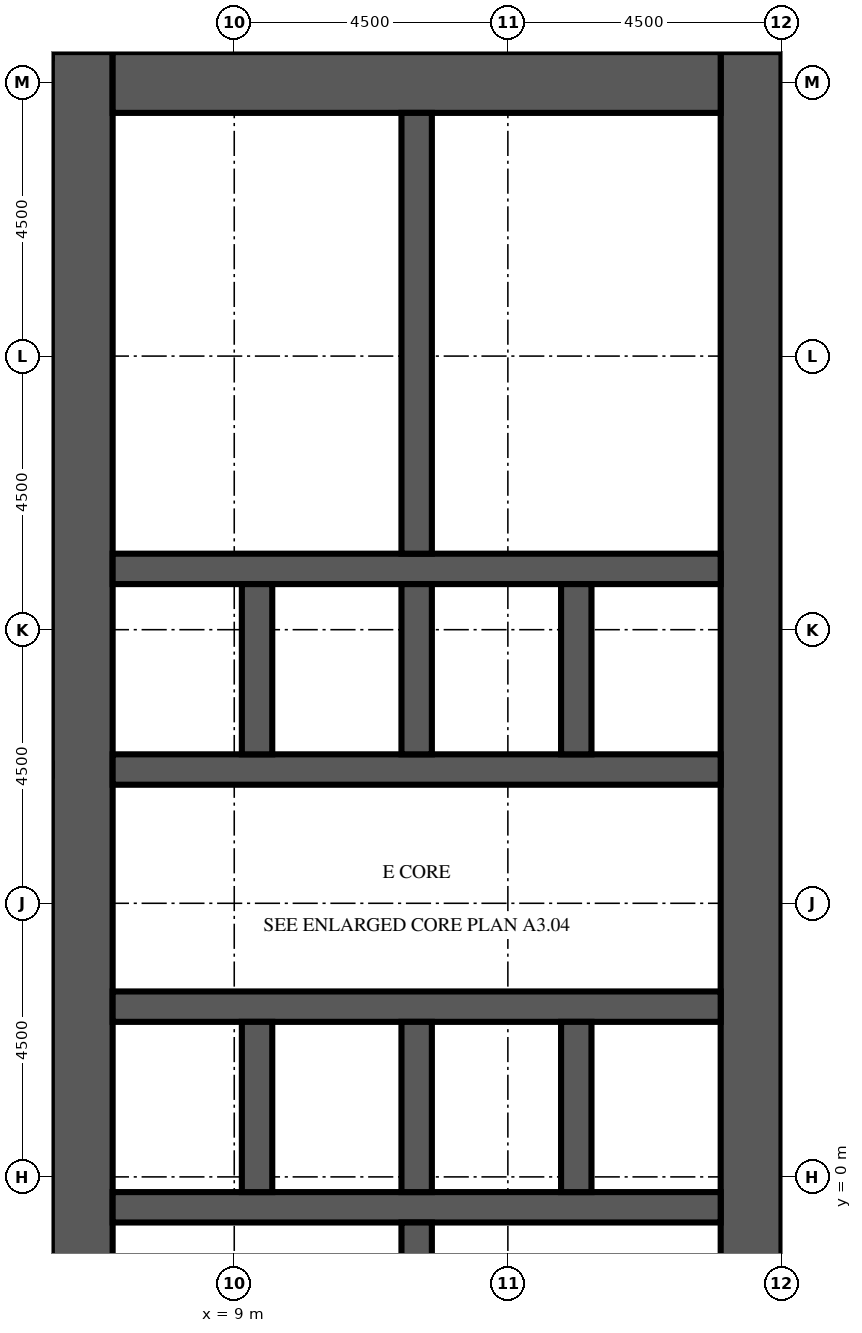
"""IFC4 building model, lengths in metres.
Left out: names, types, materials, properties, quantities, classifications, styles, units other than length and angle.
Written with IfcOpenShell. Run it as: python <this file> out.ifc"""

import sys

from ifc_helpers import new_model, si_unit, direction, frame, frame_2d, origin, place, context, subcontext, project, spatial, rectangle, extrude, element, fill, save


model = new_model("IFC4")
c1 = context("Model", 3, precision=1e-05, world=origin(), true_north=direction((0.0, 1.0)))
c2 = subcontext(c1, "Body", "Model", "MODEL_VIEW")
j1 = project(units=[si_unit("LENGTHUNIT", "METRE"), si_unit("PLANEANGLEUNIT", "RADIAN")], contexts=[c1])
p1 = place(None, origin())
s1 = spatial("IfcSite", under=j1, at=p1, CompositionType="ELEMENT")
p2 = place(p1, origin())
s2 = spatial("IfcBuilding", under=s1, at=p2, CompositionType="ELEMENT")
p3 = place(p2, frame((0.0, 0.0, 7.2)))
s3 = spatial("IfcBuildingStorey", under=s2, at=p3, CompositionType="ELEMENT", Elevation=7.2)
p4 = place(p3, frame((6.5, -9.0, 0.0), z_axis=(0.0, 0.0, 1.0), x_axis=(0.0, 1.0, 0.0)))
e1 = element("IfcWall", 1, at=p4, inside=s3, PredefinedType="SHEAR", context=c2, shape_type="SweptSolid", body=[
    extrude(rectangle(XDim=27.5, YDim=1.0, at=frame_2d((13.75, 0.0))), origin(), (0.0, 0.0, 1.0), 4.1),
])
p5 = place(p4, frame((12.55, 0.0, 0.0)))
e2 = element("IfcOpeningElement", 2, at=p5, cuts=e1, PredefinedType="OPENING", context=c2, shape_type="SweptSolid", body=[
    extrude(rectangle(XDim=2.4, YDim=2.4, at=frame_2d((1.2, 1.2))), frame((0.0, 0.51, 0.0), z_axis=(0.0, -1.0, 0.0), x_axis=(1.0, 0.0, 0.0)), (0.0, 0.0, 1.0), 1.02),
])
p6 = place(p4, frame((4.025, 0.0, 0.0)))
e3 = element("IfcOpeningElement", 3, at=p6, cuts=e1, PredefinedType="OPENING", context=c2, shape_type="SweptSolid", body=[
    extrude(rectangle(XDim=1.2, YDim=2.1, at=frame_2d((0.6, 1.05))), frame((0.0, 0.51, 0.0), z_axis=(0.0, -1.0, 0.0), x_axis=(1.0, 0.0, 0.0)), (0.0, 0.0, 1.0), 1.02),
])
p7 = place(p4, frame((22.275, 0.0, 0.0)))
e4 = element("IfcOpeningElement", 4, at=p7, cuts=e1, PredefinedType="OPENING", context=c2, shape_type="SweptSolid", body=[
    extrude(rectangle(XDim=1.2, YDim=2.1, at=frame_2d((0.6, 1.05))), frame((0.0, 0.51, 0.0), z_axis=(0.0, -1.0, 0.0), x_axis=(1.0, 0.0, 0.0)), (0.0, 0.0, 1.0), 1.02),
])
p8 = place(p3, frame((17.5, -9.0, 0.0), z_axis=(0.0, 0.0, 1.0), x_axis=(0.0, 1.0, 0.0)))
e5 = element("IfcWall", 5, at=p8, inside=s3, PredefinedType="SHEAR", context=c2, shape_type="SweptSolid", body=[
    extrude(rectangle(XDim=27.5, YDim=1.0, at=frame_2d((13.75, 0.0))), origin(), (0.0, 0.0, 1.0), 4.1),
])
p9 = place(p8, frame((12.55, 0.0, 0.0)))
e6 = element("IfcOpeningElement", 6, at=p9, cuts=e5, PredefinedType="OPENING", context=c2, shape_type="SweptSolid", body=[
    extrude(rectangle(XDim=2.4, YDim=2.4, at=frame_2d((1.2, 1.2))), frame((0.0, 0.51, 0.0), z_axis=(0.0, -1.0, 0.0), x_axis=(1.0, 0.0, 0.0)), (0.0, 0.0, 1.0), 1.02),
])
p10 = place(p8, frame((6.825, 0.0, 0.0)))
e7 = element("IfcOpeningElement", 7, at=p10, cuts=e5, PredefinedType="OPENING", context=c2, shape_type="SweptSolid", body=[
    extrude(rectangle(XDim=1.2, YDim=2.1, at=frame_2d((0.6, 1.05))), frame((0.0, 0.51, 0.0), z_axis=(0.0, -1.0, 0.0), x_axis=(1.0, 0.0, 0.0)), (0.0, 0.0, 1.0), 1.02),
])
p11 = place(p8, frame((19.475, 0.0, 0.0)))
e8 = element("IfcOpeningElement", 8, at=p11, cuts=e5, PredefinedType="OPENING", context=c2, shape_type="SweptSolid", body=[
    extrude(rectangle(XDim=1.2, YDim=2.1, at=frame_2d((0.6, 1.05))), frame((0.0, 0.51, 0.0), z_axis=(0.0, -1.0, 0.0), x_axis=(1.0, 0.0, 0.0)), (0.0, 0.0, 1.0), 1.02),
])
p12 = place(p3, frame((7.0, 18.0, 0.0), z_axis=(0.0, 0.0, 1.0), x_axis=(1.0, 0.0, 0.0)))
e9 = element("IfcWall", 9, at=p12, inside=s3, PredefinedType="SHEAR", context=c2, shape_type="SweptSolid", body=[
    extrude(rectangle(XDim=10.0, YDim=1.0, at=frame_2d((5.0, 0.0))), origin(), (0.0, 0.0, 1.0), 4.1),
])
p13 = place(p3, frame((7.0, -0.5, 0.0), z_axis=(0.0, 0.0, 1.0), x_axis=(1.0, 0.0, 0.0)))
e10 = element("IfcWall", 10, at=p13, inside=s3, PredefinedType="SHEAR", context=c2, shape_type="SweptSolid", body=[
    extrude(rectangle(XDim=10.0, YDim=0.5, at=frame_2d((5.0, 0.0))), origin(), (0.0, 0.0, 1.0), 4.1),
])
p14 = place(p3, frame((7.0, 2.8, 0.0), z_axis=(0.0, 0.0, 1.0), x_axis=(1.0, 0.0, 0.0)))
e11 = element("IfcWall", 11, at=p14, inside=s3, PredefinedType="SHEAR", context=c2, shape_type="SweptSolid", body=[
    extrude(rectangle(XDim=10.0, YDim=0.5, at=frame_2d((5.0, 0.0))), origin(), (0.0, 0.0, 1.0), 4.1),
])
p15 = place(p14, frame((0.512, 0.0, 0.0)))
e12 = element("IfcOpeningElement", 12, at=p15, cuts=e11, PredefinedType="OPENING", context=c2, shape_type="SweptSolid", body=[
    extrude(rectangle(XDim=1.1, YDim=2.1, at=frame_2d((0.55, 1.05))), frame((0.0, 0.26, 0.0), z_axis=(0.0, -1.0, 0.0), x_axis=(1.0, 0.0, 0.0)), (0.0, 0.0, 1.0), 0.52),
])
p16 = place(p14, frame((3.137, 0.0, 0.0)))
e13 = element("IfcOpeningElement", 13, at=p16, cuts=e11, PredefinedType="OPENING", context=c2, shape_type="SweptSolid", body=[
    extrude(rectangle(XDim=1.1, YDim=2.1, at=frame_2d((0.55, 1.05))), frame((0.0, 0.26, 0.0), z_axis=(0.0, -1.0, 0.0), x_axis=(1.0, 0.0, 0.0)), (0.0, 0.0, 1.0), 0.52),
])
p17 = place(p14, frame((8.387, 0.0, 0.0)))
e14 = element("IfcOpeningElement", 14, at=p17, cuts=e11, PredefinedType="OPENING", context=c2, shape_type="SweptSolid", body=[
    extrude(rectangle(XDim=1.1, YDim=2.1, at=frame_2d((0.55, 1.05))), frame((0.0, 0.26, 0.0), z_axis=(0.0, -1.0, 0.0), x_axis=(1.0, 0.0, 0.0)), (0.0, 0.0, 1.0), 0.52),
])
p18 = place(p3, frame((7.0, 6.7, 0.0), z_axis=(0.0, 0.0, 1.0), x_axis=(1.0, 0.0, 0.0)))
e15 = element("IfcWall", 15, at=p18, inside=s3, PredefinedType="SHEAR", context=c2, shape_type="SweptSolid", body=[
    extrude(rectangle(XDim=10.0, YDim=0.5, at=frame_2d((5.0, 0.0))), origin(), (0.0, 0.0, 1.0), 4.1),
])
p19 = place(p18, frame((0.512, 0.0, 0.0)))
e16 = element("IfcOpeningElement", 16, at=p19, cuts=e15, PredefinedType="OPENING", context=c2, shape_type="SweptSolid", body=[
    extrude(rectangle(XDim=1.1, YDim=2.1, at=frame_2d((0.55, 1.05))), frame((0.0, 0.26, 0.0), z_axis=(0.0, -1.0, 0.0), x_axis=(1.0, 0.0, 0.0)), (0.0, 0.0, 1.0), 0.52),
])
p20 = place(p18, frame((3.188, 0.0, 0.0)))
e17 = element("IfcOpeningElement", 17, at=p20, cuts=e15, PredefinedType="OPENING", context=c2, shape_type="SweptSolid", body=[
    extrude(rectangle(XDim=1.0, YDim=2.1, at=frame_2d((0.5, 1.05))), frame((0.0, 0.26, 0.0), z_axis=(0.0, -1.0, 0.0), x_axis=(1.0, 0.0, 0.0)), (0.0, 0.0, 1.0), 0.52),
])
p21 = place(p18, frame((5.812, 0.0, 0.0)))
e18 = element("IfcOpeningElement", 18, at=p21, cuts=e15, PredefinedType="OPENING", context=c2, shape_type="SweptSolid", body=[
    extrude(rectangle(XDim=1.0, YDim=2.1, at=frame_2d((0.5, 1.05))), frame((0.0, 0.26, 0.0), z_axis=(0.0, -1.0, 0.0), x_axis=(1.0, 0.0, 0.0)), (0.0, 0.0, 1.0), 0.52),
])
p22 = place(p18, frame((8.438, 0.0, 0.0)))
e19 = element("IfcOpeningElement", 19, at=p22, cuts=e15, PredefinedType="OPENING", context=c2, shape_type="SweptSolid", body=[
    extrude(rectangle(XDim=1.0, YDim=2.1, at=frame_2d((0.5, 1.05))), frame((0.0, 0.26, 0.0), z_axis=(0.0, -1.0, 0.0), x_axis=(1.0, 0.0, 0.0)), (0.0, 0.0, 1.0), 0.52),
])
p23 = place(p3, frame((7.0, 10.0, 0.0), z_axis=(0.0, 0.0, 1.0), x_axis=(1.0, 0.0, 0.0)))
e20 = element("IfcWall", 20, at=p23, inside=s3, PredefinedType="SHEAR", context=c2, shape_type="SweptSolid", body=[
    extrude(rectangle(XDim=10.0, YDim=0.5, at=frame_2d((5.0, 0.0))), origin(), (0.0, 0.0, 1.0), 4.1),
])
for number, where, z_axis, x_axis in (
    (21, (9.375, -0.25, 0.0), (0.0, 0.0, 1.0), (0.0, 1.0, 0.0)),
    (22, (9.375, 6.95, 0.0), (0.0, 0.0, 1.0), (0.0, 1.0, 0.0)),
    (23, (12.0, -0.25, 0.0), (0.0, 0.0, 1.0), (0.0, 1.0, 0.0)),
    (24, (12.0, 6.95, 0.0), (0.0, 0.0, 1.0), (0.0, 1.0, 0.0)),
    (25, (14.625, -0.25, 0.0), (0.0, 0.0, 1.0), (0.0, 1.0, 0.0)),
    (26, (14.625, 6.95, 0.0), (0.0, 0.0, 1.0), (0.0, 1.0, 0.0)),
):
    element("IfcWall", number, at=place(p3, frame(where, z_axis=z_axis, x_axis=x_axis)), inside=s3, PredefinedType="SHEAR", context=c2, shape_type="SweptSolid", body=[
        extrude(rectangle(XDim=2.8, YDim=0.5, at=frame_2d((1.4, 0.0))), origin(), (0.0, 0.0, 1.0), 4.1),
    ])
for number, where, z_axis, x_axis in (
    (27, (12.0, -8.0, 0.0), (0.0, 0.0, 1.0), (0.0, 1.0, 0.0)),
    (28, (12.0, 10.25, 0.0), (0.0, 0.0, 1.0), (0.0, 1.0, 0.0)),
):
    element("IfcWall", number, at=place(p3, frame(where, z_axis=z_axis, x_axis=x_axis)), inside=s3, PredefinedType="SHEAR", context=c2, shape_type="SweptSolid", body=[
        extrude(rectangle(XDim=7.25, YDim=0.5, at=frame_2d((3.625, 0.0))), origin(), (0.0, 0.0, 1.0), 4.1),
    ])
p24 = place(p3, frame((8.5, -3.505, 0.0), z_axis=(0.0, 0.0, 1.0), x_axis=(0.0, 1.0, 0.0)))
e29 = element("IfcWall", 29, at=p24, inside=s3, PredefinedType="PARTITIONING", context=c2, shape_type="SweptSolid", body=[
    extrude(rectangle(XDim=2.755, YDim=0.1, at=frame_2d((1.377, 0.0))), origin(), (0.0, 0.0, 1.0), 3.65),
])
p25 = place(p24, frame((0.877, 0.0, 0.0)))
e30 = element("IfcOpeningElement", 30, at=p25, cuts=e29, PredefinedType="OPENING", context=c2, shape_type="SweptSolid", body=[
    extrude(rectangle(XDim=1.0, YDim=2.1, at=frame_2d((0.5, 1.05))), frame((0.0, 0.06, 0.0), z_axis=(0.0, -1.0, 0.0), x_axis=(1.0, 0.0, 0.0)), (0.0, 0.0, 1.0), 0.12),
])
p26 = place(p3, frame((8.4, 10.25, 0.0), z_axis=(0.0, 0.0, 1.0), x_axis=(0.0, 1.0, 0.0)))
e31 = element("IfcWall", 31, at=p26, inside=s3, PredefinedType="PARTITIONING", context=c2, shape_type="SweptSolid", body=[
    extrude(rectangle(XDim=2.175, YDim=0.1, at=frame_2d((1.087, 0.0))), origin(), (0.0, 0.0, 1.0), 3.65),
])
p27 = place(p26, frame((0.587, 0.0, 0.0)))
e32 = element("IfcOpeningElement", 32, at=p27, cuts=e31, PredefinedType="OPENING", context=c2, shape_type="SweptSolid", body=[
    extrude(rectangle(XDim=1.0, YDim=2.1, at=frame_2d((0.5, 1.05))), frame((0.0, 0.06, 0.0), z_axis=(0.0, -1.0, 0.0), x_axis=(1.0, 0.0, 0.0)), (0.0, 0.0, 1.0), 0.12),
])
p28 = place(p3, frame((8.4, 12.425, 0.0), z_axis=(0.0, 0.0, 1.0), x_axis=(0.0, 1.0, 0.0)))
e33 = element("IfcWall", 33, at=p28, inside=s3, PredefinedType="PARTITIONING", context=c2, shape_type="SweptSolid", body=[
    extrude(rectangle(XDim=2.32, YDim=0.1, at=frame_2d((1.16, 0.0))), origin(), (0.0, 0.0, 1.0), 3.65),
])
p29 = place(p28, frame((0.66, 0.0, 0.0)))
e34 = element("IfcOpeningElement", 34, at=p29, cuts=e33, PredefinedType="OPENING", context=c2, shape_type="SweptSolid", body=[
    extrude(rectangle(XDim=1.0, YDim=2.1, at=frame_2d((0.5, 1.05))), frame((0.0, 0.06, 0.0), z_axis=(0.0, -1.0, 0.0), x_axis=(1.0, 0.0, 0.0)), (0.0, 0.0, 1.0), 0.12),
])
p30 = place(p3, frame((8.4, 14.745, 0.0), z_axis=(0.0, 0.0, 1.0), x_axis=(0.0, 1.0, 0.0)))
e35 = element("IfcWall", 35, at=p30, inside=s3, PredefinedType="PARTITIONING", context=c2, shape_type="SweptSolid", body=[
    extrude(rectangle(XDim=2.755, YDim=0.1, at=frame_2d((1.377, 0.0))), origin(), (0.0, 0.0, 1.0), 3.65),
])
p31 = place(p30, frame((0.877, 0.0, 0.0)))
e36 = element("IfcOpeningElement", 36, at=p31, cuts=e35, PredefinedType="OPENING", context=c2, shape_type="SweptSolid", body=[
    extrude(rectangle(XDim=1.0, YDim=2.1, at=frame_2d((0.5, 1.05))), frame((0.0, 0.06, 0.0), z_axis=(0.0, -1.0, 0.0), x_axis=(1.0, 0.0, 0.0)), (0.0, 0.0, 1.0), 0.12),
])
for number, where, z_axis, x_axis in (
    (37, (8.4, 12.425, 0.0), (0.0, 0.0, 1.0), (1.0, 0.0, 0.0)),
    (38, (8.4, 14.745, 0.0), (0.0, 0.0, 1.0), (1.0, 0.0, 0.0)),
):
    element("IfcWall", number, at=place(p3, frame(where, z_axis=z_axis, x_axis=x_axis)), inside=s3, PredefinedType="PARTITIONING", context=c2, shape_type="SweptSolid", body=[
        extrude(rectangle(XDim=3.35, YDim=0.1, at=frame_2d((1.675, 0.0))), origin(), (0.0, 0.0, 1.0), 3.65),
    ])
p32 = place(p15, origin())
e39 = element("IfcDoor", 39, at=p32, inside=s3, OperationType="DOUBLE_DOOR_SLIDING", PredefinedType="DOOR", context=c2, shape_type="SweptSolid", body=[
    extrude(rectangle(XDim=1.1, YDim=2.1, at=frame_2d((0.55, 1.05))), frame((0.0, 0.025, 0.0), z_axis=(0.0, -1.0, 0.0), x_axis=(1.0, 0.0, 0.0)), (0.0, 0.0, 1.0), 0.05),
])
fill(e12, e39)
p33 = place(p16, origin())
e40 = element("IfcDoor", 40, at=p33, inside=s3, OperationType="DOUBLE_DOOR_SLIDING", PredefinedType="DOOR", context=c2, shape_type="SweptSolid", body=[
    extrude(rectangle(XDim=1.1, YDim=2.1, at=frame_2d((0.55, 1.05))), frame((0.0, 0.025, 0.0), z_axis=(0.0, -1.0, 0.0), x_axis=(1.0, 0.0, 0.0)), (0.0, 0.0, 1.0), 0.05),
])
fill(e13, e40)
p34 = place(p17, origin())
e41 = element("IfcDoor", 41, at=p34, inside=s3, OperationType="DOUBLE_DOOR_SLIDING", PredefinedType="DOOR", context=c2, shape_type="SweptSolid", body=[
    extrude(rectangle(XDim=1.1, YDim=2.1, at=frame_2d((0.55, 1.05))), frame((0.0, 0.025, 0.0), z_axis=(0.0, -1.0, 0.0), x_axis=(1.0, 0.0, 0.0)), (0.0, 0.0, 1.0), 0.05),
])
fill(e14, e41)
p35 = place(p19, origin())
e42 = element("IfcDoor", 42, at=p35, inside=s3, OperationType="DOUBLE_DOOR_SLIDING", PredefinedType="DOOR", context=c2, shape_type="SweptSolid", body=[
    extrude(rectangle(XDim=1.1, YDim=2.1, at=frame_2d((0.55, 1.05))), frame((0.0, 0.025, 0.0), z_axis=(0.0, -1.0, 0.0), x_axis=(1.0, 0.0, 0.0)), (0.0, 0.0, 1.0), 0.05),
])
fill(e16, e42)
p36 = place(p5, origin())
e43 = element("IfcDoor", 43, at=p36, inside=s3, OperationType="DOUBLE_DOOR_DOUBLE_SWING", PredefinedType="DOOR", context=c2, shape_type="SweptSolid", body=[
    extrude(rectangle(XDim=2.4, YDim=2.4, at=frame_2d((1.2, 1.2))), frame((0.0, 0.025, 0.0), z_axis=(0.0, -1.0, 0.0), x_axis=(1.0, 0.0, 0.0)), (0.0, 0.0, 1.0), 0.05),
])
fill(e2, e43)
p37 = place(p9, origin())
e44 = element("IfcDoor", 44, at=p37, inside=s3, OperationType="DOUBLE_DOOR_DOUBLE_SWING", PredefinedType="DOOR", context=c2, shape_type="SweptSolid", body=[
    extrude(rectangle(XDim=2.4, YDim=2.4, at=frame_2d((1.2, 1.2))), frame((0.0, 0.025, 0.0), z_axis=(0.0, -1.0, 0.0), x_axis=(1.0, 0.0, 0.0)), (0.0, 0.0, 1.0), 0.05),
])
fill(e6, e44)
p38 = place(p10, frame((1.2, 0.0, 0.0), z_axis=(0.0, 0.0, 1.0), x_axis=(-1.0, 0.0, 0.0)))
e45 = element("IfcDoor", 45, at=p38, inside=s3, OperationType="SINGLE_SWING_LEFT", PredefinedType="DOOR", context=c2, shape_type="SweptSolid", body=[
    extrude(rectangle(XDim=1.2, YDim=2.1, at=frame_2d((0.6, 1.05))), frame((0.0, 0.025, 0.0), z_axis=(0.0, -1.0, 0.0), x_axis=(1.0, 0.0, 0.0)), (0.0, 0.0, 1.0), 0.05),
])
fill(e7, e45)
p39 = place(p11, frame((1.2, 0.0, 0.0), z_axis=(0.0, 0.0, 1.0), x_axis=(-1.0, 0.0, 0.0)))
e46 = element("IfcDoor", 46, at=p39, inside=s3, OperationType="SINGLE_SWING_LEFT", PredefinedType="DOOR", context=c2, shape_type="SweptSolid", body=[
    extrude(rectangle(XDim=1.2, YDim=2.1, at=frame_2d((0.6, 1.05))), frame((0.0, 0.025, 0.0), z_axis=(0.0, -1.0, 0.0), x_axis=(1.0, 0.0, 0.0)), (0.0, 0.0, 1.0), 0.05),
])
fill(e8, e46)
p40 = place(p20, origin())
e47 = element("IfcDoor", 47, at=p40, inside=s3, OperationType="SINGLE_SWING_RIGHT", PredefinedType="DOOR", context=c2, shape_type="SweptSolid", body=[
    extrude(rectangle(XDim=1.0, YDim=2.1, at=frame_2d((0.5, 1.05))), frame((0.0, 0.025, 0.0), z_axis=(0.0, -1.0, 0.0), x_axis=(1.0, 0.0, 0.0)), (0.0, 0.0, 1.0), 0.05),
])
fill(e17, e47)
p41 = place(p21, origin())
e48 = element("IfcDoor", 48, at=p41, inside=s3, OperationType="SINGLE_SWING_LEFT", PredefinedType="DOOR", context=c2, shape_type="SweptSolid", body=[
    extrude(rectangle(XDim=1.0, YDim=2.1, at=frame_2d((0.5, 1.05))), frame((0.0, 0.025, 0.0), z_axis=(0.0, -1.0, 0.0), x_axis=(1.0, 0.0, 0.0)), (0.0, 0.0, 1.0), 0.05),
])
fill(e18, e48)
p42 = place(p22, origin())
e49 = element("IfcDoor", 49, at=p42, inside=s3, OperationType="SINGLE_SWING_RIGHT", PredefinedType="DOOR", context=c2, shape_type="SweptSolid", body=[
    extrude(rectangle(XDim=1.0, YDim=2.1, at=frame_2d((0.5, 1.05))), frame((0.0, 0.025, 0.0), z_axis=(0.0, -1.0, 0.0), x_axis=(1.0, 0.0, 0.0)), (0.0, 0.0, 1.0), 0.05),
])
fill(e19, e49)
p43 = place(p7, origin())
e50 = element("IfcDoor", 50, at=p43, inside=s3, OperationType="SINGLE_SWING_RIGHT", PredefinedType="DOOR", context=c2, shape_type="SweptSolid", body=[
    extrude(rectangle(XDim=1.2, YDim=2.1, at=frame_2d((0.6, 1.05))), frame((0.0, -0.425, 0.0), z_axis=(0.0, -1.0, 0.0), x_axis=(1.0, 0.0, 0.0)), (0.0, 0.0, 1.0), 0.05),
])
fill(e4, e50)
p44 = place(p27, origin())
e51 = element("IfcDoor", 51, at=p44, inside=s3, OperationType="SINGLE_SWING_LEFT", PredefinedType="DOOR", context=c2, shape_type="SweptSolid", body=[
    extrude(rectangle(XDim=1.0, YDim=2.1, at=frame_2d((0.5, 1.05))), frame((0.0, 0.025, 0.0), z_axis=(0.0, -1.0, 0.0), x_axis=(1.0, 0.0, 0.0)), (0.0, 0.0, 1.0), 0.05),
])
fill(e32, e51)
p45 = place(p29, origin())
e52 = element("IfcDoor", 52, at=p45, inside=s3, OperationType="SINGLE_SWING_RIGHT", PredefinedType="DOOR", context=c2, shape_type="SweptSolid", body=[
    extrude(rectangle(XDim=1.0, YDim=2.1, at=frame_2d((0.5, 1.05))), frame((0.0, 0.025, 0.0), z_axis=(0.0, -1.0, 0.0), x_axis=(1.0, 0.0, 0.0)), (0.0, 0.0, 1.0), 0.05),
])
fill(e34, e52)
p46 = place(p31, origin())
e53 = element("IfcDoor", 53, at=p46, inside=s3, OperationType="SINGLE_SWING_LEFT", PredefinedType="DOOR", context=c2, shape_type="SweptSolid", body=[
    extrude(rectangle(XDim=1.0, YDim=2.1, at=frame_2d((0.5, 1.05))), frame((0.0, 0.025, 0.0), z_axis=(0.0, -1.0, 0.0), x_axis=(1.0, 0.0, 0.0)), (0.0, 0.0, 1.0), 0.05),
])
fill(e36, e53)
save(model, sys.argv[1])
